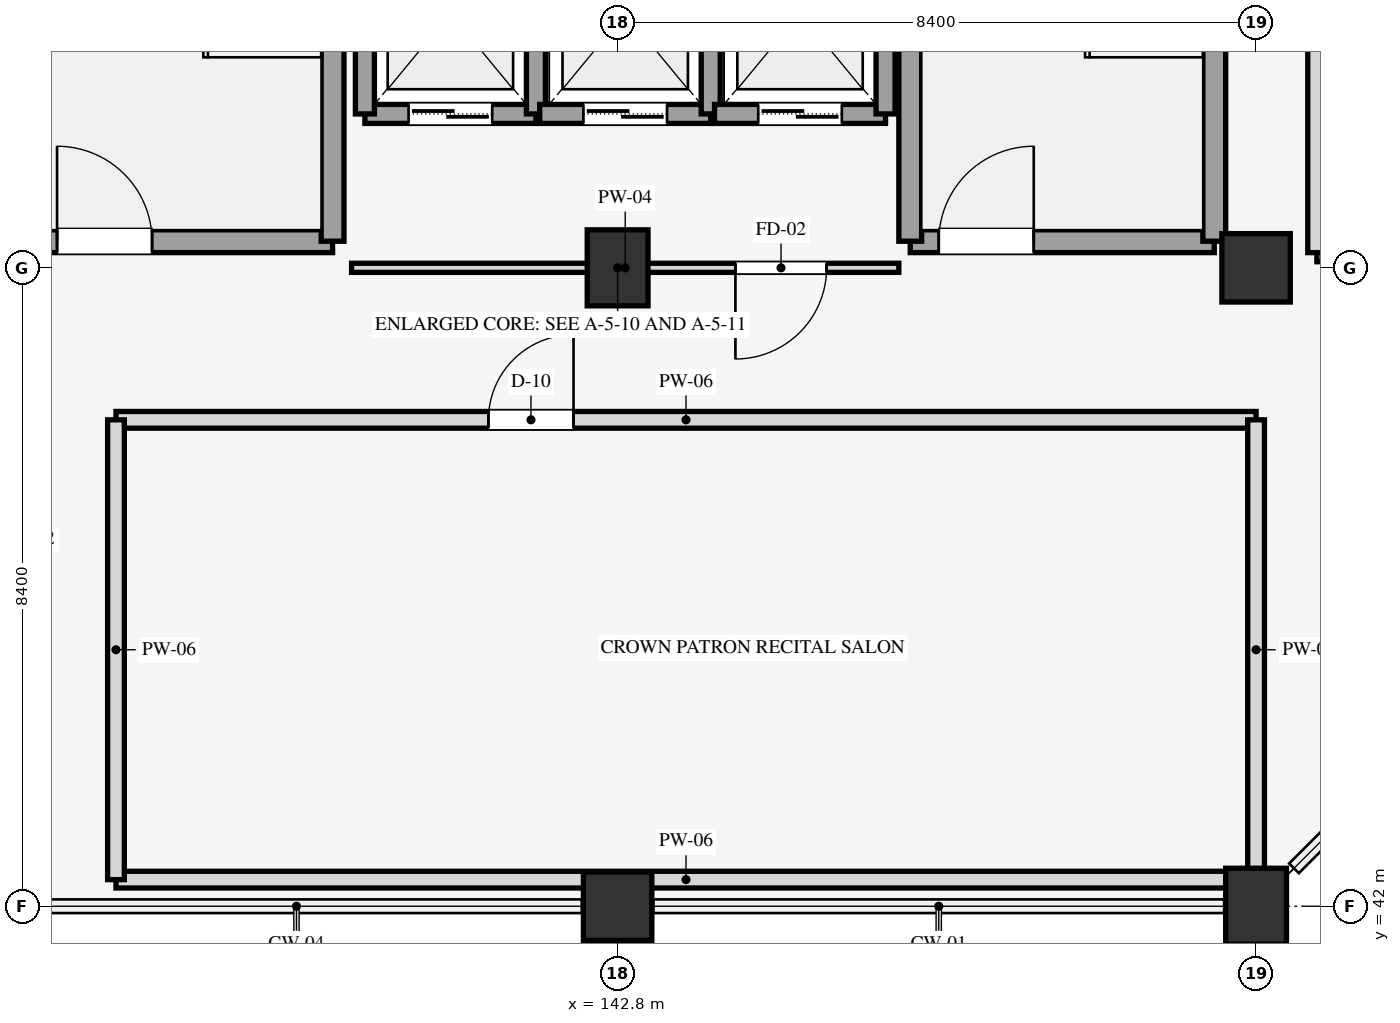
"""IFC4 building model, lengths in metres.
Left out: names, types, materials, properties, quantities, classifications, styles, units other than length and angle.
Written with IfcOpenShell. Run it as: python <this file> out.ifc"""

import sys

from ifc_helpers import new_model, si_unit, direction, frame, frame_2d, origin, origin_2d, place, context, subcontext, project, spatial, rectangle, extrude, element, fill, save


model = new_model("IFC4")
c1 = context("Model", 3, precision=1e-05, world=origin(), true_north=direction((0.0, 1.0)))
c2 = subcontext(c1, "Body", "Model", "MODEL_VIEW")
j1 = project(units=[si_unit("LENGTHUNIT", "METRE"), si_unit("PLANEANGLEUNIT", "RADIAN")], contexts=[c1])
p1 = place(None, origin())
s1 = spatial("IfcSite", under=j1, at=p1, CompositionType="ELEMENT")
p2 = place(p1, origin())
s2 = spatial("IfcBuilding", under=s1, at=p2, CompositionType="ELEMENT")
p3 = place(p2, frame((0.0, 0.0, 69.9)))
s3 = spatial("IfcBuildingStorey", under=s2, at=p3, CompositionType="ELEMENT", Elevation=69.9)
p4 = place(p3, frame((142.8, 42.0, 0.0), z_axis=(0.0, 0.0, 1.0), x_axis=(1.0, 0.0, 0.0)))
e1 = element("IfcColumn", 1, at=p4, inside=s3, PredefinedType="COLUMN", context=c2, shape_type="SweptSolid", body=[
    extrude(rectangle(XDim=0.9, YDim=0.9, at=origin_2d()), origin(), (0.0, 0.0, 1.0), 4.5),
])
for number, where, z_axis, x_axis in (
    (2, (142.8, 50.4, 0.0), (0.0, 0.0, 1.0), (1.0, 0.0, 0.0)),
    (3, (151.2, 42.0, 0.0), (0.0, 0.0, 1.0), (1.0, 0.0, 0.0)),
):
    element("IfcColumn", number, at=place(p3, frame(where, z_axis=z_axis, x_axis=x_axis)), inside=s3, PredefinedType="COLUMN", context=c2, shape_type="SweptSolid", body=[
        extrude(rectangle(XDim=0.8, YDim=1.0, at=origin_2d()), origin(), (0.0, 0.0, 1.0), 4.5),
    ])
p5 = place(p3, frame((151.2, 50.4, 0.0), z_axis=(0.0, 0.0, 1.0), x_axis=(1.0, 0.0, 0.0)))
e4 = element("IfcColumn", 4, at=p5, inside=s3, PredefinedType="COLUMN", context=c2, shape_type="SweptSolid", body=[
    extrude(rectangle(XDim=0.9, YDim=0.9, at=origin_2d()), origin(), (0.0, 0.0, 1.0), 4.5),
])
p6 = place(p3, frame((135.05, 50.75, 0.0), z_axis=(0.0, 0.0, 1.0), x_axis=(1.0, 0.0, 0.0)))
e5 = element("IfcWall", 5, at=p6, inside=s3, PredefinedType="SHEAR", context=c2, shape_type="SweptSolid", body=[
    extrude(rectangle(XDim=4.0, YDim=0.3, at=frame_2d((2.0, 0.0))), origin(), (0.0, 0.0, 1.0), 4.5),
])
p7 = place(p6, frame((0.375, 0.0, 0.0)))
e6 = element("IfcOpeningElement", 6, at=p7, cuts=e5, PredefinedType="OPENING", context=c2, shape_type="SweptSolid", body=[
    extrude(rectangle(XDim=1.25, YDim=2.15, at=frame_2d((0.625, 1.075))), frame((0.0, 0.16, 0.0), z_axis=(0.0, -1.0, 0.0), x_axis=(1.0, 0.0, 0.0)), (0.0, 0.0, 1.0), 0.32),
])
p8 = place(p3, frame((139.05, 50.75, 0.0), z_axis=(0.0, 0.0, 1.0), x_axis=(0.0, 1.0, 0.0)))
e7 = element("IfcWall", 7, at=p8, inside=s3, PredefinedType="SHEAR", context=c2, shape_type="SweptSolid", body=[
    extrude(rectangle(XDim=14.3, YDim=0.3, at=frame_2d((7.15, 0.0))), origin(), (0.0, 0.0, 1.0), 4.5),
])
p9 = place(p3, frame((137.25, 52.4, 0.0), z_axis=(0.0, 0.0, 1.0), x_axis=(0.0, 1.0, 0.0)))
e8 = element("IfcWall", 8, at=p9, inside=s3, PredefinedType="SHEAR", context=c2, shape_type="SweptSolid", body=[
    extrude(rectangle(XDim=11.0, YDim=0.2, at=frame_2d((5.5, 0.0))), origin(), (0.0, 0.0, 1.0), 4.5),
])
p10 = place(p3, frame((146.65, 50.75, 0.0), z_axis=(0.0, 0.0, 1.0), x_axis=(1.0, 0.0, 0.0)))
e9 = element("IfcWall", 9, at=p10, inside=s3, PredefinedType="SHEAR", context=c2, shape_type="SweptSolid", body=[
    extrude(rectangle(XDim=4.0, YDim=0.3, at=frame_2d((2.0, 0.0))), origin(), (0.0, 0.0, 1.0), 4.5),
])
p11 = place(p10, frame((0.375, 0.0, 0.0)))
e10 = element("IfcOpeningElement", 10, at=p11, cuts=e9, PredefinedType="OPENING", context=c2, shape_type="SweptSolid", body=[
    extrude(rectangle(XDim=1.25, YDim=2.15, at=frame_2d((0.625, 1.075))), frame((0.0, 0.16, 0.0), z_axis=(0.0, -1.0, 0.0), x_axis=(1.0, 0.0, 0.0)), (0.0, 0.0, 1.0), 0.32),
])
for number, where, z_axis, x_axis in (
    (11, (146.65, 50.75, 0.0), (0.0, 0.0, 1.0), (0.0, 1.0, 0.0)),
    (12, (150.65, 50.75, 0.0), (0.0, 0.0, 1.0), (0.0, 1.0, 0.0)),
):
    element("IfcWall", number, at=place(p3, frame(where, z_axis=z_axis, x_axis=x_axis)), inside=s3, PredefinedType="SHEAR", context=c2, shape_type="SweptSolid", body=[
        extrude(rectangle(XDim=14.3, YDim=0.3, at=frame_2d((7.15, 0.0))), origin(), (0.0, 0.0, 1.0), 4.5),
    ])
p12 = place(p3, frame((148.85, 52.4, 0.0), z_axis=(0.0, 0.0, 1.0), x_axis=(0.0, 1.0, 0.0)))
e13 = element("IfcWall", 13, at=p12, inside=s3, PredefinedType="SHEAR", context=c2, shape_type="SweptSolid", body=[
    extrude(rectangle(XDim=11.0, YDim=0.2, at=frame_2d((5.5, 0.0))), origin(), (0.0, 0.0, 1.0), 4.5),
])
p13 = place(p3, frame((139.475, 52.425, 0.0), z_axis=(0.0, 0.0, 1.0), x_axis=(1.0, 0.0, 0.0)))
e14 = element("IfcWall", 14, at=p13, inside=s3, PredefinedType="SHEAR", context=c2, shape_type="SweptSolid", body=[
    extrude(rectangle(XDim=2.25, YDim=0.25, at=frame_2d((1.125, 0.0))), origin(), (0.0, 0.0, 1.0), 4.26),
])
p14 = place(p13, frame((0.575, 0.0, 0.0)))
e15 = element("IfcOpeningElement", 15, at=p14, cuts=e14, PredefinedType="OPENING", context=c2, shape_type="SweptSolid", body=[
    extrude(rectangle(XDim=1.1, YDim=2.15, at=frame_2d((0.55, 1.075))), frame((0.0, 0.135, 0.0), z_axis=(0.0, -1.0, 0.0), x_axis=(1.0, 0.0, 0.0)), (0.0, 0.0, 1.0), 0.27),
])
for number, where, z_axis, x_axis in (
    (16, (139.475, 52.425, 0.0), (0.0, 0.0, 1.0), (0.0, 1.0, 0.0)),
    (17, (141.725, 52.425, 0.0), (0.0, 0.0, 1.0), (0.0, 1.0, 0.0)),
):
    element("IfcWall", number, at=place(p3, frame(where, z_axis=z_axis, x_axis=x_axis)), inside=s3, PredefinedType="SHEAR", context=c2, shape_type="SweptSolid", body=[
        extrude(rectangle(XDim=2.65, YDim=0.25, at=frame_2d((1.325, 0.0))), origin(), (0.0, 0.0, 1.0), 4.26),
    ])
p15 = place(p3, frame((141.775, 52.425, 0.0), z_axis=(0.0, 0.0, 1.0), x_axis=(1.0, 0.0, 0.0)))
e18 = element("IfcWall", 18, at=p15, inside=s3, PredefinedType="SHEAR", context=c2, shape_type="SweptSolid", body=[
    extrude(rectangle(XDim=2.25, YDim=0.25, at=frame_2d((1.125, 0.0))), origin(), (0.0, 0.0, 1.0), 4.26),
])
p16 = place(p15, frame((0.575, 0.0, 0.0)))
e19 = element("IfcOpeningElement", 19, at=p16, cuts=e18, PredefinedType="OPENING", context=c2, shape_type="SweptSolid", body=[
    extrude(rectangle(XDim=1.1, YDim=2.15, at=frame_2d((0.55, 1.075))), frame((0.0, 0.135, 0.0), z_axis=(0.0, -1.0, 0.0), x_axis=(1.0, 0.0, 0.0)), (0.0, 0.0, 1.0), 0.27),
])
p17 = place(p3, frame((144.025, 52.425, 0.0), z_axis=(0.0, 0.0, 1.0), x_axis=(0.0, 1.0, 0.0)))
e20 = element("IfcWall", 20, at=p17, inside=s3, PredefinedType="SHEAR", context=c2, shape_type="SweptSolid", body=[
    extrude(rectangle(XDim=2.65, YDim=0.25, at=frame_2d((1.325, 0.0))), origin(), (0.0, 0.0, 1.0), 4.26),
])
p18 = place(p3, frame((144.075, 52.425, 0.0), z_axis=(0.0, 0.0, 1.0), x_axis=(1.0, 0.0, 0.0)))
e21 = element("IfcWall", 21, at=p18, inside=s3, PredefinedType="SHEAR", context=c2, shape_type="SweptSolid", body=[
    extrude(rectangle(XDim=2.25, YDim=0.25, at=frame_2d((1.125, 0.0))), origin(), (0.0, 0.0, 1.0), 4.26),
])
p19 = place(p18, frame((0.575, 0.0, 0.0)))
e22 = element("IfcOpeningElement", 22, at=p19, cuts=e21, PredefinedType="OPENING", context=c2, shape_type="SweptSolid", body=[
    extrude(rectangle(XDim=1.1, YDim=2.15, at=frame_2d((0.55, 1.075))), frame((0.0, 0.135, 0.0), z_axis=(0.0, -1.0, 0.0), x_axis=(1.0, 0.0, 0.0)), (0.0, 0.0, 1.0), 0.27),
])
p20 = place(p3, frame((146.325, 52.425, 0.0), z_axis=(0.0, 0.0, 1.0), x_axis=(0.0, 1.0, 0.0)))
e23 = element("IfcWall", 23, at=p20, inside=s3, PredefinedType="SHEAR", context=c2, shape_type="SweptSolid", body=[
    extrude(rectangle(XDim=2.65, YDim=0.25, at=frame_2d((1.325, 0.0))), origin(), (0.0, 0.0, 1.0), 4.26),
])
p21 = place(p3, frame((139.3, 50.4, 0.0), z_axis=(0.0, 0.0, 1.0), x_axis=(1.0, 0.0, 0.0)))
e24 = element("IfcWall", 24, at=p21, inside=s3, PredefinedType="PARTITIONING", context=c2, shape_type="SweptSolid", body=[
    extrude(rectangle(XDim=7.2, YDim=0.12, at=frame_2d((3.6, 0.0))), origin(), (0.0, 0.0, 1.0), 3.54),
])
p22 = place(p21, frame((5.05, 0.0, 0.0)))
e25 = element("IfcOpeningElement", 25, at=p22, cuts=e24, PredefinedType="OPENING", context=c2, shape_type="SweptSolid", body=[
    extrude(rectangle(XDim=1.2, YDim=2.15, at=frame_2d((0.6, 1.075))), frame((0.0, 0.07, 0.0), z_axis=(0.0, -1.0, 0.0), x_axis=(1.0, 0.0, 0.0)), (0.0, 0.0, 1.0), 0.14),
])
p23 = place(p3, frame((152.0, 50.6, 0.0), z_axis=(0.0, 0.0, 1.0), x_axis=(1.0, 0.0, 0.0)))
e26 = element("IfcWall", 26, at=p23, inside=s3, PredefinedType="PARTITIONING", context=c2, shape_type="SweptSolid", body=[
    extrude(rectangle(XDim=7.2, YDim=0.24, at=frame_2d((3.6, 0.0))), origin(), (0.0, 0.0, 1.0), 3.54),
])
p24 = place(p3, frame((152.0, 50.6, 0.0), z_axis=(0.0, 0.0, 1.0), x_axis=(0.0, 1.0, 0.0)))
e27 = element("IfcWall", 27, at=p24, inside=s3, PredefinedType="PARTITIONING", context=c2, shape_type="SweptSolid", body=[
    extrude(rectangle(XDim=16.4, YDim=0.24, at=frame_2d((8.2, 0.0))), origin(), (0.0, 0.0, 1.0), 3.54),
])
p25 = place(p24, frame((14.75, 0.0, 0.0)))
e28 = element("IfcOpeningElement", 28, at=p25, cuts=e27, PredefinedType="OPENING", context=c2, shape_type="SweptSolid", body=[
    extrude(rectangle(XDim=1.05, YDim=2.16, at=frame_2d((0.525, 1.08))), frame((0.0, 0.13, 0.0), z_axis=(0.0, -1.0, 0.0), x_axis=(1.0, 0.0, 0.0)), (0.0, 0.0, 1.0), 0.26),
])
p26 = place(p3, frame((136.2, 42.35, 0.0), z_axis=(0.0, 0.0, 1.0), x_axis=(1.0, 0.0, 0.0)))
e29 = element("IfcWall", 29, at=p26, inside=s3, PredefinedType="PARTITIONING", context=c2, shape_type="SweptSolid", body=[
    extrude(rectangle(XDim=15.0, YDim=0.22, at=frame_2d((7.5, 0.0))), origin(), (0.0, 0.0, 1.0), 3.54),
])
p27 = place(p3, frame((136.2, 48.4, 0.0), z_axis=(0.0, 0.0, 1.0), x_axis=(1.0, 0.0, 0.0)))
e30 = element("IfcWall", 30, at=p27, inside=s3, PredefinedType="PARTITIONING", context=c2, shape_type="SweptSolid", body=[
    extrude(rectangle(XDim=15.0, YDim=0.22, at=frame_2d((7.5, 0.0))), origin(), (0.0, 0.0, 1.0), 3.54),
])
p28 = place(p27, frame((4.9, 0.0, 0.0)))
e31 = element("IfcOpeningElement", 31, at=p28, cuts=e30, PredefinedType="OPENING", context=c2, shape_type="SweptSolid", body=[
    extrude(rectangle(XDim=1.12, YDim=2.14, at=frame_2d((0.56, 1.07))), frame((0.0, 0.12, 0.0), z_axis=(0.0, -1.0, 0.0), x_axis=(1.0, 0.0, 0.0)), (0.0, 0.0, 1.0), 0.24),
])
for number, where, z_axis, x_axis in (
    (32, (136.2, 42.35, 0.0), (0.0, 0.0, 1.0), (0.0, 1.0, 0.0)),
    (33, (151.2, 42.35, 0.0), (0.0, 0.0, 1.0), (0.0, 1.0, 0.0)),
):
    element("IfcWall", number, at=place(p3, frame(where, z_axis=z_axis, x_axis=x_axis)), inside=s3, PredefinedType="PARTITIONING", context=c2, shape_type="SweptSolid", body=[
        extrude(rectangle(XDim=6.05, YDim=0.22, at=frame_2d((3.025, 0.0))), origin(), (0.0, 0.0, 1.0), 3.54),
    ])
p29 = place(p7, origin())
e34 = element("IfcDoor", 34, at=p29, inside=s3, OperationType="SINGLE_SWING_LEFT", PredefinedType="DOOR", context=c2, shape_type="SweptSolid", body=[
    extrude(rectangle(XDim=1.25, YDim=2.15, at=frame_2d((0.625, 1.075))), frame((0.0, 0.025, 0.0), z_axis=(0.0, -1.0, 0.0), x_axis=(1.0, 0.0, 0.0)), (0.0, 0.0, 1.0), 0.05),
])
fill(e6, e34)
p30 = place(p11, origin())
e35 = element("IfcDoor", 35, at=p30, inside=s3, OperationType="SINGLE_SWING_RIGHT", PredefinedType="DOOR", context=c2, shape_type="SweptSolid", body=[
    extrude(rectangle(XDim=1.25, YDim=2.15, at=frame_2d((0.625, 1.075))), frame((0.0, 0.025, 0.0), z_axis=(0.0, -1.0, 0.0), x_axis=(1.0, 0.0, 0.0)), (0.0, 0.0, 1.0), 0.05),
])
fill(e10, e35)
p31 = place(p14, origin())
e36 = element("IfcDoor", 36, at=p31, inside=s3, OperationType="DOUBLE_DOOR_SLIDING", PredefinedType="DOOR", context=c2, shape_type="SweptSolid", body=[
    extrude(rectangle(XDim=1.1, YDim=2.15, at=frame_2d((0.55, 1.075))), frame((0.0, 0.025, 0.0), z_axis=(0.0, -1.0, 0.0), x_axis=(1.0, 0.0, 0.0)), (0.0, 0.0, 1.0), 0.05),
])
fill(e15, e36)
p32 = place(p16, origin())
e37 = element("IfcDoor", 37, at=p32, inside=s3, OperationType="DOUBLE_DOOR_SLIDING", PredefinedType="DOOR", context=c2, shape_type="SweptSolid", body=[
    extrude(rectangle(XDim=1.1, YDim=2.15, at=frame_2d((0.55, 1.075))), frame((0.0, 0.025, 0.0), z_axis=(0.0, -1.0, 0.0), x_axis=(1.0, 0.0, 0.0)), (0.0, 0.0, 1.0), 0.05),
])
fill(e19, e37)
p33 = place(p19, origin())
e38 = element("IfcDoor", 38, at=p33, inside=s3, OperationType="DOUBLE_DOOR_SLIDING", PredefinedType="DOOR", context=c2, shape_type="SweptSolid", body=[
    extrude(rectangle(XDim=1.1, YDim=2.15, at=frame_2d((0.55, 1.075))), frame((0.0, 0.025, 0.0), z_axis=(0.0, -1.0, 0.0), x_axis=(1.0, 0.0, 0.0)), (0.0, 0.0, 1.0), 0.05),
])
fill(e22, e38)
p34 = place(p22, frame((1.2, 0.0, 0.0), z_axis=(0.0, 0.0, 1.0), x_axis=(-1.0, 0.0, 0.0)))
e39 = element("IfcDoor", 39, at=p34, inside=s3, OperationType="SINGLE_SWING_RIGHT", PredefinedType="DOOR", context=c2, shape_type="SweptSolid", body=[
    extrude(rectangle(XDim=1.2, YDim=2.15, at=frame_2d((0.6, 1.075))), frame((0.0, 0.025, 0.0), z_axis=(0.0, -1.0, 0.0), x_axis=(1.0, 0.0, 0.0)), (0.0, 0.0, 1.0), 0.05),
])
fill(e25, e39)
p35 = place(p28, origin())
e40 = element("IfcDoor", 40, at=p35, inside=s3, OperationType="SINGLE_SWING_RIGHT", PredefinedType="DOOR", context=c2, shape_type="SweptSolid", body=[
    extrude(rectangle(XDim=1.12, YDim=2.14, at=frame_2d((0.56, 1.07))), frame((0.0, 0.025, 0.0), z_axis=(0.0, -1.0, 0.0), x_axis=(1.0, 0.0, 0.0)), (0.0, 0.0, 1.0), 0.05),
])
fill(e31, e40)
save(model, sys.argv[1])
